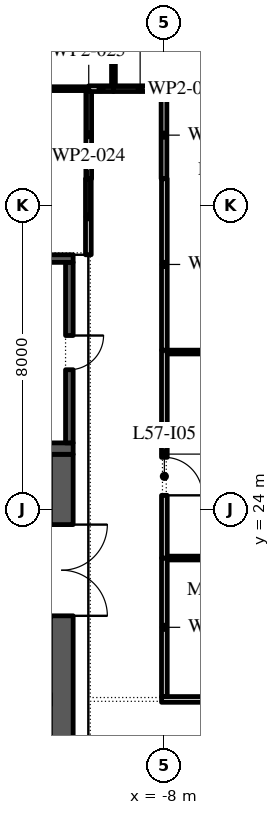
"""IFC4 building model, lengths in metres.
Left out: names, types, materials, properties, quantities, classifications, styles, units other than length and angle.
Written with IfcOpenShell. Run it as: python <this file> out.ifc"""

import sys

from ifc_helpers import new_model, si_unit, direction, frame, frame_2d, origin, place, context, subcontext, project, spatial, rectangle, extrude, element, fill, save


model = new_model("IFC4")
c1 = context("Model", 3, precision=1e-05, world=origin(), true_north=direction((0.0, 1.0)))
c2 = subcontext(c1, "Body", "Model", "MODEL_VIEW")
j1 = project(units=[si_unit("LENGTHUNIT", "METRE"), si_unit("PLANEANGLEUNIT", "RADIAN")], contexts=[c1])
p1 = place(None, origin())
s1 = spatial("IfcSite", under=j1, at=p1, CompositionType="ELEMENT")
p2 = place(p1, origin())
s2 = spatial("IfcBuilding", under=s1, at=p2, CompositionType="ELEMENT")
p3 = place(p2, frame((0.0, 0.0, 264.0)))
s3 = spatial("IfcBuildingStorey", under=s2, at=p3, CompositionType="ELEMENT", Elevation=264.0)
p4 = place(p3, frame((-10.7, -2.45, 0.0), z_axis=(0.0, 0.0, 1.0), x_axis=(0.0, 1.0, 0.0)))
e1 = element("IfcWall", 1, at=p4, inside=s3, PredefinedType="SHEAR", context=c2, shape_type="SweptSolid", body=[
    extrude(rectangle(XDim=27.9, YDim=0.6, at=frame_2d((13.95, 0.0))), origin(), (0.0, 0.0, 1.0), 4.0),
])
p5 = place(p4, frame((23.65, 0.0, 0.0)))
e2 = element("IfcOpeningElement", 2, at=p5, cuts=e1, PredefinedType="OPENING", context=c2, shape_type="SweptSolid", body=[
    extrude(rectangle(XDim=2.4, YDim=2.1, at=frame_2d((1.2, 1.05))), frame((0.0, 0.31, 0.0), z_axis=(0.0, -1.0, 0.0), x_axis=(1.0, 0.0, 0.0)), (0.0, 0.0, 1.0), 0.62),
])
p6 = place(p4, frame((0.788, 0.0, 0.0)))
e3 = element("IfcOpeningElement", 3, at=p6, cuts=e1, PredefinedType="OPENING", context=c2, shape_type="SweptSolid", body=[
    extrude(rectangle(XDim=0.9, YDim=2.1, at=frame_2d((0.45, 1.05))), frame((0.0, 0.31, 0.0), z_axis=(0.0, -1.0, 0.0), x_axis=(1.0, 0.0, 0.0)), (0.0, 0.0, 1.0), 0.62),
])
p7 = place(p4, frame((3.962, 0.0, 0.0)))
e4 = element("IfcOpeningElement", 4, at=p7, cuts=e1, PredefinedType="OPENING", context=c2, shape_type="SweptSolid", body=[
    extrude(rectangle(XDim=1.0, YDim=2.1, at=frame_2d((0.5, 1.05))), frame((0.0, 0.31, 0.0), z_axis=(0.0, -1.0, 0.0), x_axis=(1.0, 0.0, 0.0)), (0.0, 0.0, 1.0), 0.62),
])
p8 = place(p3, frame((-21.6, 25.6, 0.0), z_axis=(0.0, 0.0, 1.0), x_axis=(1.0, 0.0, 0.0)))
e5 = element("IfcWall", 5, at=p8, inside=s3, PredefinedType="SHEAR", context=c2, shape_type="SweptSolid", body=[
    extrude(rectangle(XDim=11.2, YDim=0.3, at=frame_2d((5.6, 0.0))), origin(), (0.0, 0.0, 1.0), 4.0),
])
p9 = place(p3, frame((-10.5, 25.75, 0.0), z_axis=(0.0, 0.0, 1.0), x_axis=(0.0, 1.0, 0.0)))
e6 = element("IfcWall", 6, at=p9, inside=s3, PredefinedType="SHEAR", context=c2, shape_type="SweptSolid", body=[
    extrude(rectangle(XDim=4.75, YDim=0.2, at=frame_2d((2.375, 0.0))), origin(), (0.0, 0.0, 1.0), 4.0),
])
p10 = place(p9, frame((1.925, 0.0, 0.0)))
e7 = element("IfcOpeningElement", 7, at=p10, cuts=e6, PredefinedType="OPENING", context=c2, shape_type="SweptSolid", body=[
    extrude(rectangle(XDim=0.9, YDim=2.1, at=frame_2d((0.45, 1.05))), frame((0.0, 0.11, 0.0), z_axis=(0.0, -1.0, 0.0), x_axis=(1.0, 0.0, 0.0)), (0.0, 0.0, 1.0), 0.22),
])
p11 = place(p3, frame((-21.6, 30.6, 0.0), z_axis=(0.0, 0.0, 1.0), x_axis=(1.0, 0.0, 0.0)))
e8 = element("IfcWall", 8, at=p11, inside=s3, PredefinedType="SHEAR", context=c2, shape_type="SweptSolid", body=[
    extrude(rectangle(XDim=11.2, YDim=0.2, at=frame_2d((5.6, 0.0))), origin(), (0.0, 0.0, 1.0), 4.0),
])
p12 = place(p3, frame((-17.19, 35.07, 0.0), z_axis=(0.0, 0.0, 1.0), x_axis=(1.0, 0.0, 0.0)))
e9 = element("IfcWall", 9, at=p12, inside=s3, PredefinedType="PARTITIONING", context=c2, shape_type="SweptSolid", body=[
    extrude(rectangle(XDim=7.2, YDim=0.1, at=frame_2d((3.6, 0.0))), origin(), (0.0, 0.0, 1.0), 4.0),
])
p13 = place(p3, frame((-10.0, 30.7, 0.0), z_axis=(0.0, 0.0, 1.0), x_axis=(0.0, 1.0, 0.0)))
e10 = element("IfcWall", 10, at=p13, inside=s3, PredefinedType="PARTITIONING", context=c2, shape_type="SweptSolid", body=[
    extrude(rectangle(XDim=2.0, YDim=0.15, at=frame_2d((1.0, 0.0))), origin(), (0.0, 0.0, 1.0), 4.0),
])
p14 = place(p3, frame((-9.99, 32.7, 0.0), z_axis=(0.0, 0.0, 1.0), x_axis=(0.0, 1.0, 0.0)))
e11 = element("IfcWall", 11, at=p14, inside=s3, PredefinedType="PARTITIONING", context=c2, shape_type="SweptSolid", body=[
    extrude(rectangle(XDim=2.32, YDim=0.15, at=frame_2d((1.16, 0.0))), origin(), (0.0, 0.0, 1.0), 4.0),
])
p15 = place(p3, frame((-9.99, 35.07, 0.0), z_axis=(0.0, 0.0, 1.0), x_axis=(1.0, 0.0, 0.0)))
e12 = element("IfcWall", 12, at=p15, inside=s3, PredefinedType="PARTITIONING", context=c2, shape_type="SweptSolid", body=[
    extrude(rectangle(XDim=0.65, YDim=0.15, at=frame_2d((0.325, 0.0))), origin(), (0.0, 0.0, 1.0), 4.0),
])
p16 = place(p3, frame((-9.34, 35.145, 0.0), z_axis=(0.0, 0.0, 1.0), x_axis=(0.0, 1.0, 0.0)))
e13 = element("IfcWall", 13, at=p16, inside=s3, PredefinedType="PARTITIONING", context=c2, shape_type="SweptSolid", body=[
    extrude(rectangle(XDim=8.405, YDim=0.1, at=frame_2d((4.203, 0.0))), origin(), (0.0, 0.0, 1.0), 4.0),
])
p17 = place(p16, frame((4.505, 0.0, 0.0)))
e14 = element("IfcOpeningElement", 14, at=p17, cuts=e13, PredefinedType="OPENING", context=c2, shape_type="SweptSolid", body=[
    extrude(rectangle(XDim=0.9, YDim=2.1, at=frame_2d((0.45, 1.05))), frame((0.0, 0.06, 0.0), z_axis=(0.0, -1.0, 0.0), x_axis=(1.0, 0.0, 0.0)), (0.0, 0.0, 1.0), 0.12),
])
p18 = place(p3, frame((-9.34, 35.07, 0.0), z_axis=(0.0, 0.0, 1.0), x_axis=(1.0, 0.0, 0.0)))
e15 = element("IfcWall", 15, at=p18, inside=s3, PredefinedType="PARTITIONING", context=c2, shape_type="SweptSolid", body=[
    extrude(rectangle(XDim=1.405, YDim=0.15, at=frame_2d((0.703, 0.0))), origin(), (0.0, 0.0, 1.0), 4.0),
])
p19 = place(p3, frame((-8.01, 34.995, 0.0), z_axis=(0.0, 0.0, 1.0), x_axis=(0.0, -1.0, 0.0)))
e16 = element("IfcWall", 16, at=p19, inside=s3, PredefinedType="PARTITIONING", context=c2, shape_type="SweptSolid", body=[
    extrude(rectangle(XDim=2.295, YDim=0.15, at=frame_2d((1.147, 0.0))), origin(), (0.0, 0.0, 1.0), 4.0),
])
p20 = place(p3, frame((-7.935, 35.07, 0.0), z_axis=(0.0, 0.0, 1.0), x_axis=(1.0, 0.0, 0.0)))
e17 = element("IfcWall", 17, at=p20, inside=s3, PredefinedType="PARTITIONING", context=c2, shape_type="SweptSolid", body=[
    extrude(rectangle(XDim=6.91, YDim=0.1, at=frame_2d((3.455, 0.0))), origin(), (0.0, 0.0, 1.0), 4.0),
])
p21 = place(p3, frame((-8.075, 19.0, 0.0), z_axis=(0.0, 0.0, 1.0), x_axis=(1.0, 0.0, 0.0)))
e18 = element("IfcWall", 18, at=p21, inside=s3, PredefinedType="PARTITIONING", context=c2, shape_type="SweptSolid", body=[
    extrude(rectangle(XDim=7.05, YDim=0.15, at=frame_2d((3.525, 0.0))), origin(), (0.0, 0.0, 1.0), 4.0),
])
p22 = place(p21, frame((1.575, 0.0, 0.0)))
e19 = element("IfcOpeningElement", 19, at=p22, cuts=e18, PredefinedType="OPENING", context=c2, shape_type="SweptSolid", body=[
    extrude(rectangle(XDim=1.0, YDim=2.1, at=frame_2d((0.5, 1.05))), frame((0.0, 0.085, 0.0), z_axis=(0.0, -1.0, 0.0), x_axis=(1.0, 0.0, 0.0)), (0.0, 0.0, 1.0), 0.17),
])
p23 = place(p3, frame((-8.0, 22.72, 0.0), z_axis=(0.0, 0.0, 1.0), x_axis=(0.0, -1.0, 0.0)))
e20 = element("IfcWall", 20, at=p23, inside=s3, PredefinedType="PARTITIONING", context=c2, shape_type="SweptSolid", body=[
    extrude(rectangle(XDim=3.645, YDim=0.15, at=frame_2d((1.823, 0.0))), origin(), (0.0, 0.0, 1.0), 4.0),
])
p24 = place(p3, frame((-7.925, 22.72, 0.0), z_axis=(0.0, 0.0, 1.0), x_axis=(1.0, 0.0, 0.0)))
e21 = element("IfcWall", 21, at=p24, inside=s3, PredefinedType="PARTITIONING", context=c2, shape_type="SweptSolid", body=[
    extrude(rectangle(XDim=6.9, YDim=0.1, at=frame_2d((3.45, 0.0))), origin(), (0.0, 0.0, 1.0), 4.0),
])
p25 = place(p3, frame((-8.0, 28.19, 0.0), z_axis=(0.0, 0.0, 1.0), x_axis=(0.0, -1.0, 0.0)))
e22 = element("IfcWall", 22, at=p25, inside=s3, PredefinedType="PARTITIONING", context=c2, shape_type="SweptSolid", body=[
    extrude(rectangle(XDim=5.47, YDim=0.15, at=frame_2d((2.735, 0.0))), origin(), (0.0, 0.0, 1.0), 4.0),
])
p26 = place(p25, frame((2.82, 0.0, 0.0)))
e23 = element("IfcOpeningElement", 23, at=p26, cuts=e22, PredefinedType="OPENING", context=c2, shape_type="SweptSolid", body=[
    extrude(rectangle(XDim=1.0, YDim=2.1, at=frame_2d((0.5, 1.05))), frame((0.0, 0.085, 0.0), z_axis=(0.0, -1.0, 0.0), x_axis=(1.0, 0.0, 0.0)), (0.0, 0.0, 1.0), 0.17),
])
p27 = place(p3, frame((-7.925, 28.14, 0.0), z_axis=(0.0, 0.0, 1.0), x_axis=(1.0, 0.0, 0.0)))
e24 = element("IfcWall", 24, at=p27, inside=s3, PredefinedType="PARTITIONING", context=c2, shape_type="SweptSolid", body=[
    extrude(rectangle(XDim=6.9, YDim=0.1, at=frame_2d((3.45, 0.0))), origin(), (0.0, 0.0, 1.0), 4.0),
])
p28 = place(p3, frame((-8.0, 32.7, 0.0), z_axis=(0.0, 0.0, 1.0), x_axis=(0.0, -1.0, 0.0)))
e25 = element("IfcWall", 25, at=p28, inside=s3, PredefinedType="PARTITIONING", context=c2, shape_type="SweptSolid", body=[
    extrude(rectangle(XDim=4.51, YDim=0.15, at=frame_2d((2.255, 0.0))), origin(), (0.0, 0.0, 1.0), 4.0),
])
p29 = place(p5, frame((2.4, 0.0, 0.0), z_axis=(0.0, 0.0, 1.0), x_axis=(-1.0, 0.0, 0.0)))
e26 = element("IfcDoor", 26, at=p29, inside=s3, OperationType="DOUBLE_DOOR_SINGLE_SWING", PredefinedType="DOOR", context=c2, shape_type="SweptSolid", body=[
    extrude(rectangle(XDim=2.4, YDim=2.1, at=frame_2d((1.2, 1.05))), frame((0.0, 0.025, 0.0), z_axis=(0.0, -1.0, 0.0), x_axis=(1.0, 0.0, 0.0)), (0.0, 0.0, 1.0), 0.05),
])
fill(e2, e26)
p30 = place(p10, frame((0.9, 0.15, 0.0), z_axis=(0.0, 0.0, 1.0), x_axis=(-1.0, 0.0, 0.0)))
e27 = element("IfcDoor", 27, at=p30, inside=s3, OperationType="SINGLE_SWING_RIGHT", PredefinedType="DOOR", context=c2, shape_type="SweptSolid", body=[
    extrude(rectangle(XDim=0.9, YDim=2.1, at=frame_2d((0.45, 1.05))), frame((0.0, 0.1, 0.0), z_axis=(0.0, -1.0, 0.0), x_axis=(1.0, 0.0, 0.0)), (0.0, 0.0, 1.0), 0.05),
])
fill(e7, e27)
p31 = place(p26, origin())
e28 = element("IfcDoor", 28, at=p31, inside=s3, OperationType="SINGLE_SWING_LEFT", PredefinedType="DOOR", context=c2, shape_type="SweptSolid", body=[
    extrude(rectangle(XDim=1.0, YDim=2.1, at=frame_2d((0.5, 1.05))), frame((0.0, 0.025, 0.0), z_axis=(0.0, -1.0, 0.0), x_axis=(1.0, 0.0, 0.0)), (0.0, 0.0, 1.0), 0.05),
])
fill(e23, e28)
save(model, sys.argv[1])
